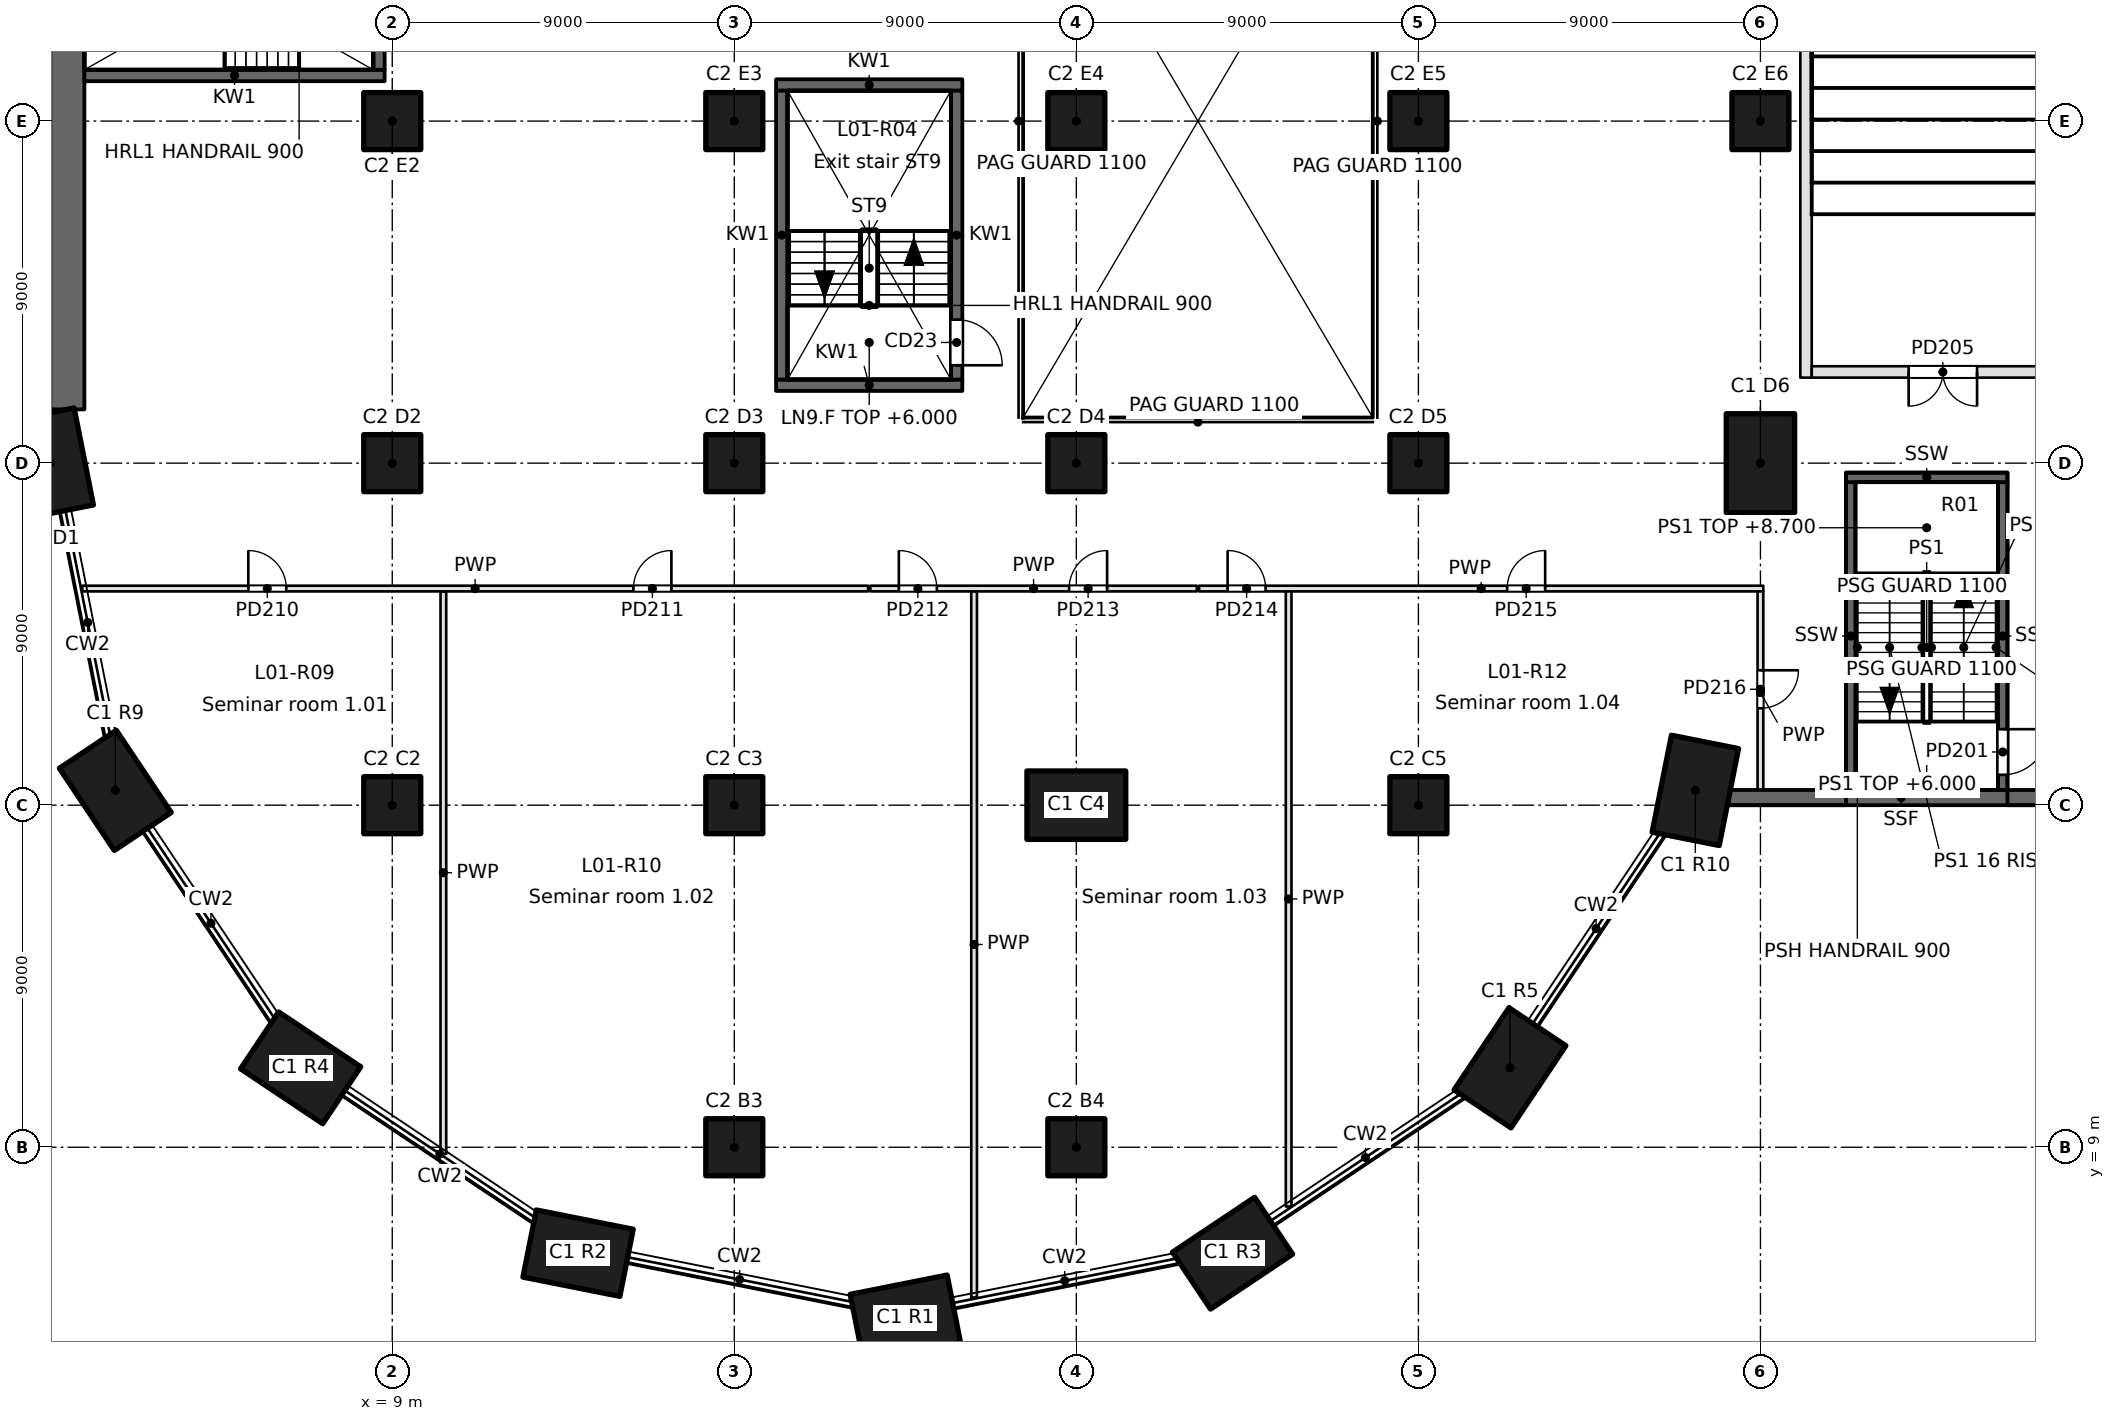
"""IFC4 building model, lengths in metres.
Left out: names, types, materials, properties, quantities, classifications, styles, units other than length and angle.
Written with IfcOpenShell. Run it as: python <this file> out.ifc"""

import sys

from ifc_helpers import new_model, si_unit, direction, frame, frame_2d, origin, origin_2d, place, context, subcontext, project, spatial, rectangle, extrude, element, fill, save


model = new_model("IFC4")
c1 = context("Model", 3, precision=1e-05, world=origin(), true_north=direction((0.0, 1.0)))
c2 = subcontext(c1, "Body", "Model", "MODEL_VIEW")
j1 = project(units=[si_unit("LENGTHUNIT", "METRE"), si_unit("PLANEANGLEUNIT", "RADIAN")], contexts=[c1])
p1 = place(None, origin())
s1 = spatial("IfcSite", under=j1, at=p1, CompositionType="ELEMENT")
p2 = place(p1, origin())
s2 = spatial("IfcBuilding", under=s1, at=p2, CompositionType="ELEMENT")
p3 = place(p2, frame((0.0, 0.0, 6.0)))
s3 = spatial("IfcBuildingStorey", under=s2, at=p3, CompositionType="ELEMENT", Elevation=6.0)
for number, where, z_axis, x_axis in (
    (1, (22.5, 4.5, 0.0), (0.0, 0.0, 1.0), (0.981, 0.195, 0.0)),
    (2, (13.89, 6.213, 0.0), (0.0, 0.0, 1.0), (-0.981, 0.195, 0.0)),
    (3, (31.11, 6.213, 0.0), (0.0, 0.0, 1.0), (0.831, 0.556, 0.0)),
    (4, (6.59, 11.09, 0.0), (0.0, 0.0, 1.0), (-0.831, 0.556, 0.0)),
    (5, (38.41, 11.09, 0.0), (0.0, 0.0, 1.0), (0.556, 0.831, 0.0)),
    (6, (1.713, 18.39, 0.0), (0.0, 0.0, 1.0), (-0.556, 0.831, 0.0)),
    (7, (43.287, 18.39, 0.0), (0.0, 0.0, 1.0), (0.195, 0.981, 0.0)),
    (8, (0.0, 27.0, 0.0), (0.0, 0.0, 1.0), (-0.195, 0.981, 0.0)),
    (9, (45.0, 27.0, 0.0), (0.0, 0.0, 1.0), (0.0, 1.0, 0.0)),
):
    element("IfcColumn", number, at=place(p3, frame(where, z_axis=z_axis, x_axis=x_axis)), inside=s3, PredefinedType="COLUMN", context=c2, shape_type="SweptSolid", body=[
        extrude(rectangle(XDim=2.6, YDim=1.8, at=origin_2d()), origin(), (0.0, 0.0, 1.0), 5.4),
    ])
for number, where, z_axis, x_axis in (
    (10, (45.0, 36.0, 0.0), (0.0, 0.0, 1.0), (1.0, 0.0, 0.0)),
    (11, (9.0, 18.0, 0.0), (0.0, 0.0, 1.0), (1.0, 0.0, 0.0)),
    (12, (9.0, 27.0, 0.0), (0.0, 0.0, 1.0), (1.0, 0.0, 0.0)),
    (13, (9.0, 36.0, 0.0), (0.0, 0.0, 1.0), (1.0, 0.0, 0.0)),
    (14, (18.0, 18.0, 0.0), (0.0, 0.0, 1.0), (1.0, 0.0, 0.0)),
    (15, (18.0, 27.0, 0.0), (0.0, 0.0, 1.0), (1.0, 0.0, 0.0)),
    (16, (18.0, 36.0, 0.0), (0.0, 0.0, 1.0), (1.0, 0.0, 0.0)),
):
    element("IfcColumn", number, at=place(p3, frame(where, z_axis=z_axis, x_axis=x_axis)), inside=s3, PredefinedType="COLUMN", context=c2, shape_type="SweptSolid", body=[
        extrude(rectangle(XDim=1.5, YDim=1.5, at=origin_2d()), origin(), (0.0, 0.0, 1.0), 5.4),
    ])
p4 = place(p3, frame((27.0, 18.0, 0.0), z_axis=(0.0, 0.0, 1.0), x_axis=(1.0, 0.0, 0.0)))
e17 = element("IfcColumn", 17, at=p4, inside=s3, PredefinedType="COLUMN", context=c2, shape_type="SweptSolid", body=[
    extrude(rectangle(XDim=2.6, YDim=1.8, at=origin_2d()), origin(), (0.0, 0.0, 1.0), 5.4),
])
for number, where, z_axis, x_axis in (
    (18, (27.0, 27.0, 0.0), (0.0, 0.0, 1.0), (1.0, 0.0, 0.0)),
    (19, (27.0, 36.0, 0.0), (0.0, 0.0, 1.0), (1.0, 0.0, 0.0)),
    (20, (36.0, 18.0, 0.0), (0.0, 0.0, 1.0), (1.0, 0.0, 0.0)),
    (21, (36.0, 27.0, 0.0), (0.0, 0.0, 1.0), (1.0, 0.0, 0.0)),
    (22, (36.0, 36.0, 0.0), (0.0, 0.0, 1.0), (1.0, 0.0, 0.0)),
    (23, (18.0, 9.0, 0.0), (0.0, 0.0, 1.0), (1.0, 0.0, 0.0)),
    (24, (27.0, 9.0, 0.0), (0.0, 0.0, 1.0), (1.0, 0.0, 0.0)),
):
    element("IfcColumn", number, at=place(p3, frame(where, z_axis=z_axis, x_axis=x_axis)), inside=s3, PredefinedType="COLUMN", context=c2, shape_type="SweptSolid", body=[
        extrude(rectangle(XDim=1.5, YDim=1.5, at=origin_2d()), origin(), (0.0, 0.0, 1.0), 5.4),
    ])
p5 = place(p3, frame((0.45, 94.5, 0.0), z_axis=(0.0, 0.0, 1.0), x_axis=(0.0, -1.0, 0.0)))
e25 = element("IfcWall", 25, at=p5, inside=s3, PredefinedType="SHEAR", context=c2, shape_type="SweptSolid", body=[
    extrude(rectangle(XDim=66.085, YDim=0.9, at=frame_2d((33.042, 0.0))), origin(), (0.0, 0.0, 1.0), 5.4),
])
for number, where, z_axis, x_axis in (
    (26, (19.1, 29.05, -0.35), (0.0, 0.0, 1.0), (1.0, 0.0, 0.0)),
    (27, (19.1, 36.95, -0.35), (0.0, 0.0, 1.0), (1.0, 0.0, 0.0)),
):
    element("IfcWall", number, at=place(p3, frame(where, z_axis=z_axis, x_axis=x_axis)), inside=s3, PredefinedType="SOLIDWALL", context=c2, shape_type="SweptSolid", body=[
        extrude(rectangle(XDim=4.9, YDim=0.3, at=frame_2d((2.45, 0.0))), origin(), (0.0, 0.0, 1.0), 5.4),
    ])
p6 = place(p3, frame((0.9, 37.2, -0.35), z_axis=(0.0, 0.0, 1.0), x_axis=(1.0, 0.0, 0.0)))
e28 = element("IfcWall", 28, at=p6, inside=s3, PredefinedType="SOLIDWALL", context=c2, shape_type="SweptSolid", body=[
    extrude(rectangle(XDim=7.9, YDim=0.3, at=frame_2d((3.95, 0.0))), origin(), (0.0, 0.0, 1.0), 5.4),
])
p7 = place(p3, frame((8.65, 37.35, -0.35), z_axis=(0.0, 0.0, 1.0), x_axis=(0.0, 1.0, 0.0)))
e29 = element("IfcWall", 29, at=p7, inside=s3, PredefinedType="SOLIDWALL", context=c2, shape_type="SweptSolid", body=[
    extrude(rectangle(XDim=4.3, YDim=0.3, at=frame_2d((2.15, 0.0))), origin(), (0.0, 0.0, 1.0), 5.4),
])
p8 = place(p3, frame((19.25, 29.2, -0.35), z_axis=(0.0, 0.0, 1.0), x_axis=(0.0, 1.0, 0.0)))
e30 = element("IfcWall", 30, at=p8, inside=s3, PredefinedType="SOLIDWALL", context=c2, shape_type="SweptSolid", body=[
    extrude(rectangle(XDim=7.6, YDim=0.3, at=frame_2d((3.8, 0.0))), origin(), (0.0, 0.0, 1.0), 5.4),
])
p9 = place(p3, frame((23.85, 29.2, -0.35), z_axis=(0.0, 0.0, 1.0), x_axis=(0.0, 1.0, 0.0)))
e31 = element("IfcWall", 31, at=p9, inside=s3, PredefinedType="SOLIDWALL", context=c2, shape_type="SweptSolid", body=[
    extrude(rectangle(XDim=7.6, YDim=0.3, at=frame_2d((3.8, 0.0))), origin(), (0.0, 0.0, 1.0), 5.4),
])
p10 = place(p9, frame((0.375, 0.0, 0.35)))
e32 = element("IfcOpeningElement", 32, at=p10, cuts=e31, PredefinedType="OPENING", context=c2, shape_type="SweptSolid", body=[
    extrude(rectangle(XDim=1.2, YDim=2.1, at=frame_2d((0.6, 1.05))), frame((0.0, 0.15, 0.0), z_axis=(0.0, -1.0, 0.0), x_axis=(1.0, 0.0, 0.0)), (0.0, 0.0, 1.0), 0.3),
])
p11 = place(p3, frame((47.375, 18.4, 0.0), z_axis=(0.0, 0.0, 1.0), x_axis=(0.0, 1.0, 0.0)))
e33 = element("IfcWall", 33, at=p11, inside=s3, PredefinedType="SOLIDWALL", context=c2, shape_type="SweptSolid", body=[
    extrude(rectangle(XDim=8.1, YDim=0.25, at=frame_2d((4.05, 0.0))), origin(), (0.0, 0.0, 1.0), 5.4),
])
p12 = place(p3, frame((51.375, 26.5, 0.0), z_axis=(0.0, 0.0, 1.0), x_axis=(0.0, -1.0, 0.0)))
e34 = element("IfcWall", 34, at=p12, inside=s3, PredefinedType="SOLIDWALL", context=c2, shape_type="SweptSolid", body=[
    extrude(rectangle(XDim=8.1, YDim=0.25, at=frame_2d((4.05, 0.0))), origin(), (0.0, 0.0, 1.0), 5.4),
])
p13 = place(p12, frame((6.5, 0.0, 0.0)))
e35 = element("IfcOpeningElement", 35, at=p13, cuts=e34, PredefinedType="OPENING", context=c2, shape_type="SweptSolid", body=[
    extrude(rectangle(XDim=1.2, YDim=2.1, at=frame_2d((0.6, 1.05))), frame((0.0, 0.125, 0.0), z_axis=(0.0, -1.0, 0.0), x_axis=(1.0, 0.0, 0.0)), (0.0, 0.0, 1.0), 0.25),
])
p14 = place(p3, frame((47.25, 26.625, 0.0), z_axis=(0.0, 0.0, 1.0), x_axis=(1.0, 0.0, 0.0)))
e36 = element("IfcWall", 36, at=p14, inside=s3, PredefinedType="SOLIDWALL", context=c2, shape_type="SweptSolid", body=[
    extrude(rectangle(XDim=4.25, YDim=0.25, at=frame_2d((2.125, 0.0))), origin(), (0.0, 0.0, 1.0), 5.4),
])
p15 = place(p3, frame((46.2, 29.25, 0.0), z_axis=(0.0, 0.0, 1.0), x_axis=(0.0, 1.0, 0.0)))
e37 = element("IfcWall", 37, at=p15, inside=s3, PredefinedType="SOLIDWALL", context=c2, shape_type="SweptSolid", body=[
    extrude(rectangle(XDim=23.7, YDim=0.3, at=frame_2d((11.85, 0.0))), origin(), (0.0, 0.0, 1.0), 5.4),
])
p16 = place(p3, frame((60.3, 29.4, 0.0), z_axis=(0.0, 0.0, 1.0), x_axis=(-1.0, 0.0, 0.0)))
e38 = element("IfcWall", 38, at=p16, inside=s3, PredefinedType="SOLIDWALL", context=c2, shape_type="SweptSolid", body=[
    extrude(rectangle(XDim=13.95, YDim=0.3, at=frame_2d((6.975, 0.0))), origin(), (0.0, 0.0, 1.0), 5.4),
])
p17 = place(p16, frame((2.6, 0.0, 0.0)))
e39 = element("IfcOpeningElement", 39, at=p17, cuts=e38, PredefinedType="OPENING", context=c2, shape_type="SweptSolid", body=[
    extrude(rectangle(XDim=1.8, YDim=2.4, at=frame_2d((0.9, 1.2))), frame((0.0, 0.15, 0.0), z_axis=(0.0, -1.0, 0.0), x_axis=(1.0, 0.0, 0.0)), (0.0, 0.0, 1.0), 0.3),
])
p18 = place(p16, frame((9.6, 0.0, 0.0)))
e40 = element("IfcOpeningElement", 40, at=p18, cuts=e38, PredefinedType="OPENING", context=c2, shape_type="SweptSolid", body=[
    extrude(rectangle(XDim=1.8, YDim=2.4, at=frame_2d((0.9, 1.2))), frame((0.0, 0.15, 0.0), z_axis=(0.0, -1.0, 0.0), x_axis=(1.0, 0.0, 0.0)), (0.0, 0.0, 1.0), 0.3),
])
p19 = place(p3, frame((53.25, 18.2, 0.0), z_axis=(0.0, 0.0, 1.0), x_axis=(-1.0, 0.0, 0.0)))
e41 = element("IfcWall", 41, at=p19, inside=s3, PredefinedType="SOLIDWALL", context=c2, shape_type="SweptSolid", body=[
    extrude(rectangle(XDim=9.093, YDim=0.4, at=frame_2d((4.546, 0.0))), origin(), (0.0, 0.0, 1.0), 5.05),
])
p20 = place(p3, frame((10.345, 8.822, 0.0), z_axis=(0.0, 0.0, 1.0), x_axis=(0.0, 1.0, 0.0)))
e42 = element("IfcWall", 42, at=p20, inside=s3, PredefinedType="PARTITIONING", context=c2, shape_type="SweptSolid", body=[
    extrude(rectangle(XDim=14.803, YDim=0.15, at=frame_2d((7.401, 0.0))), origin(), (0.0, 0.0, 1.0), 5.05),
])
p21 = place(p3, frame((0.842, 23.7, 0.0), z_axis=(0.0, 0.0, 1.0), x_axis=(1.0, 0.0, 0.0)))
e43 = element("IfcWall", 43, at=p21, inside=s3, PredefinedType="PARTITIONING", context=c2, shape_type="SweptSolid", body=[
    extrude(rectangle(XDim=20.678, YDim=0.15, at=frame_2d((10.339, 0.0))), origin(), (0.0, 0.0, 1.0), 5.05),
])
p22 = place(p21, frame((4.37, 0.0, 0.0)))
e44 = element("IfcOpeningElement", 44, at=p22, cuts=e43, PredefinedType="OPENING", context=c2, shape_type="SweptSolid", body=[
    extrude(rectangle(XDim=1.0, YDim=2.1, at=frame_2d((0.5, 1.05))), frame((0.0, 0.075, 0.0), z_axis=(0.0, -1.0, 0.0), x_axis=(1.0, 0.0, 0.0)), (0.0, 0.0, 1.0), 0.15),
])
p23 = place(p21, frame((14.503, 0.0, 0.0)))
e45 = element("IfcOpeningElement", 45, at=p23, cuts=e43, PredefinedType="OPENING", context=c2, shape_type="SweptSolid", body=[
    extrude(rectangle(XDim=1.0, YDim=2.1, at=frame_2d((0.5, 1.05))), frame((0.0, 0.075, 0.0), z_axis=(0.0, -1.0, 0.0), x_axis=(1.0, 0.0, 0.0)), (0.0, 0.0, 1.0), 0.15),
])
p24 = place(p3, frame((21.58, 23.7, 0.0), z_axis=(0.0, 0.0, 1.0), x_axis=(1.0, 0.0, 0.0)))
e46 = element("IfcWall", 46, at=p24, inside=s3, PredefinedType="PARTITIONING", context=c2, shape_type="SweptSolid", body=[
    extrude(rectangle(XDim=8.59, YDim=0.15, at=frame_2d((4.295, 0.0))), origin(), (0.0, 0.0, 1.0), 5.05),
])
p25 = place(p24, frame((0.75, 0.0, 0.0)))
e47 = element("IfcOpeningElement", 47, at=p25, cuts=e46, PredefinedType="OPENING", context=c2, shape_type="SweptSolid", body=[
    extrude(rectangle(XDim=1.0, YDim=2.1, at=frame_2d((0.5, 1.05))), frame((0.0, 0.075, 0.0), z_axis=(0.0, -1.0, 0.0), x_axis=(1.0, 0.0, 0.0)), (0.0, 0.0, 1.0), 0.15),
])
p26 = place(p24, frame((5.23, 0.0, 0.0)))
e48 = element("IfcOpeningElement", 48, at=p26, cuts=e46, PredefinedType="OPENING", context=c2, shape_type="SweptSolid", body=[
    extrude(rectangle(XDim=1.0, YDim=2.1, at=frame_2d((0.5, 1.05))), frame((0.0, 0.075, 0.0), z_axis=(0.0, -1.0, 0.0), x_axis=(1.0, 0.0, 0.0)), (0.0, 0.0, 1.0), 0.15),
])
p27 = place(p3, frame((30.23, 23.7, 0.0), z_axis=(0.0, 0.0, 1.0), x_axis=(1.0, 0.0, 0.0)))
e49 = element("IfcWall", 49, at=p27, inside=s3, PredefinedType="PARTITIONING", context=c2, shape_type="SweptSolid", body=[
    extrude(rectangle(XDim=14.845, YDim=0.15, at=frame_2d((7.422, 0.0))), origin(), (0.0, 0.0, 1.0), 5.05),
])
p28 = place(p27, frame((0.75, 0.0, 0.0)))
e50 = element("IfcOpeningElement", 50, at=p28, cuts=e49, PredefinedType="OPENING", context=c2, shape_type="SweptSolid", body=[
    extrude(rectangle(XDim=1.0, YDim=2.1, at=frame_2d((0.5, 1.05))), frame((0.0, 0.075, 0.0), z_axis=(0.0, -1.0, 0.0), x_axis=(1.0, 0.0, 0.0)), (0.0, 0.0, 1.0), 0.15),
])
p29 = place(p27, frame((8.106, 0.0, 0.0)))
e51 = element("IfcOpeningElement", 51, at=p29, cuts=e49, PredefinedType="OPENING", context=c2, shape_type="SweptSolid", body=[
    extrude(rectangle(XDim=1.0, YDim=2.1, at=frame_2d((0.5, 1.05))), frame((0.0, 0.075, 0.0), z_axis=(0.0, -1.0, 0.0), x_axis=(1.0, 0.0, 0.0)), (0.0, 0.0, 1.0), 0.15),
])
p30 = place(p3, frame((24.31, 5.046, 0.0), z_axis=(0.0, 0.0, 1.0), x_axis=(0.0, 1.0, 0.0)))
e52 = element("IfcWall", 52, at=p30, inside=s3, PredefinedType="PARTITIONING", context=c2, shape_type="SweptSolid", body=[
    extrude(rectangle(XDim=18.579, YDim=0.15, at=frame_2d((9.29, 0.0))), origin(), (0.0, 0.0, 1.0), 5.05),
])
p31 = place(p3, frame((32.586, 7.44, 0.0), z_axis=(0.0, 0.0, 1.0), x_axis=(0.0, 1.0, 0.0)))
e53 = element("IfcWall", 53, at=p31, inside=s3, PredefinedType="PARTITIONING", context=c2, shape_type="SweptSolid", body=[
    extrude(rectangle(XDim=16.185, YDim=0.15, at=frame_2d((8.093, 0.0))), origin(), (0.0, 0.0, 1.0), 5.05),
])
p32 = place(p3, frame((45.0, 23.625, 0.0), z_axis=(0.0, 0.0, 1.0), x_axis=(0.0, -1.0, 0.0)))
e54 = element("IfcWall", 54, at=p32, inside=s3, PredefinedType="PARTITIONING", context=c2, shape_type="SweptSolid", body=[
    extrude(rectangle(XDim=5.325, YDim=0.15, at=frame_2d((2.663, 0.0))), origin(), (0.0, 0.0, 1.0), 5.05),
])
p33 = place(p32, frame((2.075, 0.0, 0.0)))
e55 = element("IfcOpeningElement", 55, at=p33, cuts=e54, PredefinedType="OPENING", context=c2, shape_type="SweptSolid", body=[
    extrude(rectangle(XDim=1.0, YDim=2.1, at=frame_2d((0.5, 1.05))), frame((0.0, 0.075, 0.0), z_axis=(0.0, -1.0, 0.0), x_axis=(1.0, 0.0, 0.0)), (0.0, 0.0, 1.0), 0.15),
])
p34 = place(p10, frame((1.2, 0.0, 0.0), z_axis=(0.0, 0.0, 1.0), x_axis=(-1.0, 0.0, 0.0)))
e56 = element("IfcDoor", 56, at=p34, inside=s3, OperationType="SINGLE_SWING_RIGHT", PredefinedType="DOOR", context=c2, shape_type="SweptSolid", body=[
    extrude(rectangle(XDim=1.2, YDim=2.1, at=frame_2d((0.6, 1.05))), frame((0.0, 0.025, 0.0), z_axis=(0.0, -1.0, 0.0), x_axis=(1.0, 0.0, 0.0)), (0.0, 0.0, 1.0), 0.05),
])
fill(e32, e56)
p35 = place(p13, origin())
e57 = element("IfcDoor", 57, at=p35, inside=s3, OperationType="SINGLE_SWING_LEFT", PredefinedType="DOOR", context=c2, shape_type="SweptSolid", body=[
    extrude(rectangle(XDim=1.2, YDim=2.1, at=frame_2d((0.6, 1.05))), frame((0.0, 0.025, 0.0), z_axis=(0.0, -1.0, 0.0), x_axis=(1.0, 0.0, 0.0)), (0.0, 0.0, 1.0), 0.05),
])
fill(e35, e57)
p36 = place(p18, origin())
e58 = element("IfcDoor", 58, at=p36, inside=s3, OperationType="DOUBLE_DOOR_SINGLE_SWING", PredefinedType="DOOR", context=c2, shape_type="SweptSolid", body=[
    extrude(rectangle(XDim=1.8, YDim=2.4, at=frame_2d((0.9, 1.2))), frame((0.0, 0.025, 0.0), z_axis=(0.0, -1.0, 0.0), x_axis=(1.0, 0.0, 0.0)), (0.0, 0.0, 1.0), 0.05),
])
fill(e40, e58)
p37 = place(p22, origin())
e59 = element("IfcDoor", 59, at=p37, inside=s3, OperationType="SINGLE_SWING_LEFT", PredefinedType="DOOR", context=c2, shape_type="SweptSolid", body=[
    extrude(rectangle(XDim=1.0, YDim=2.1, at=frame_2d((0.5, 1.05))), frame((0.0, 0.025, 0.0), z_axis=(0.0, -1.0, 0.0), x_axis=(1.0, 0.0, 0.0)), (0.0, 0.0, 1.0), 0.05),
])
fill(e44, e59)
p38 = place(p23, origin())
e60 = element("IfcDoor", 60, at=p38, inside=s3, OperationType="SINGLE_SWING_RIGHT", PredefinedType="DOOR", context=c2, shape_type="SweptSolid", body=[
    extrude(rectangle(XDim=1.0, YDim=2.1, at=frame_2d((0.5, 1.05))), frame((0.0, 0.025, 0.0), z_axis=(0.0, -1.0, 0.0), x_axis=(1.0, 0.0, 0.0)), (0.0, 0.0, 1.0), 0.05),
])
fill(e45, e60)
p39 = place(p25, origin())
e61 = element("IfcDoor", 61, at=p39, inside=s3, OperationType="SINGLE_SWING_LEFT", PredefinedType="DOOR", context=c2, shape_type="SweptSolid", body=[
    extrude(rectangle(XDim=1.0, YDim=2.1, at=frame_2d((0.5, 1.05))), frame((0.0, 0.025, 0.0), z_axis=(0.0, -1.0, 0.0), x_axis=(1.0, 0.0, 0.0)), (0.0, 0.0, 1.0), 0.05),
])
fill(e47, e61)
p40 = place(p26, origin())
e62 = element("IfcDoor", 62, at=p40, inside=s3, OperationType="SINGLE_SWING_RIGHT", PredefinedType="DOOR", context=c2, shape_type="SweptSolid", body=[
    extrude(rectangle(XDim=1.0, YDim=2.1, at=frame_2d((0.5, 1.05))), frame((0.0, 0.025, 0.0), z_axis=(0.0, -1.0, 0.0), x_axis=(1.0, 0.0, 0.0)), (0.0, 0.0, 1.0), 0.05),
])
fill(e48, e62)
p41 = place(p28, origin())
e63 = element("IfcDoor", 63, at=p41, inside=s3, OperationType="SINGLE_SWING_LEFT", PredefinedType="DOOR", context=c2, shape_type="SweptSolid", body=[
    extrude(rectangle(XDim=1.0, YDim=2.1, at=frame_2d((0.5, 1.05))), frame((0.0, 0.025, 0.0), z_axis=(0.0, -1.0, 0.0), x_axis=(1.0, 0.0, 0.0)), (0.0, 0.0, 1.0), 0.05),
])
fill(e50, e63)
p42 = place(p29, origin())
e64 = element("IfcDoor", 64, at=p42, inside=s3, OperationType="SINGLE_SWING_RIGHT", PredefinedType="DOOR", context=c2, shape_type="SweptSolid", body=[
    extrude(rectangle(XDim=1.0, YDim=2.1, at=frame_2d((0.5, 1.05))), frame((0.0, 0.025, 0.0), z_axis=(0.0, -1.0, 0.0), x_axis=(1.0, 0.0, 0.0)), (0.0, 0.0, 1.0), 0.05),
])
fill(e51, e64)
p43 = place(p33, origin())
e65 = element("IfcDoor", 65, at=p43, inside=s3, OperationType="SINGLE_SWING_LEFT", PredefinedType="DOOR", context=c2, shape_type="SweptSolid", body=[
    extrude(rectangle(XDim=1.0, YDim=2.1, at=frame_2d((0.5, 1.05))), frame((0.0, 0.025, 0.0), z_axis=(0.0, -1.0, 0.0), x_axis=(1.0, 0.0, 0.0)), (0.0, 0.0, 1.0), 0.05),
])
fill(e55, e65)
save(model, sys.argv[1])
